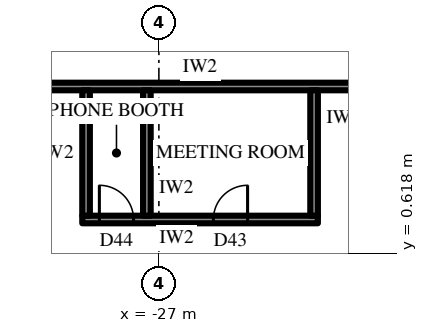
"""IFC4 building model, lengths in metres.
Left out: names, types, materials, properties, quantities, classifications, styles, units other than length and angle.
Written with IfcOpenShell. Run it as: python <this file> out.ifc"""

import sys

from ifc_helpers import new_model, si_unit, direction, frame, frame_2d, origin, place, context, subcontext, project, spatial, rectangle, extrude, element, fill, save


model = new_model("IFC4")
c1 = context("Model", 3, precision=1e-05, world=origin(), true_north=direction((0.0, 1.0)))
c2 = subcontext(c1, "Body", "Model", "MODEL_VIEW")
j1 = project(units=[si_unit("LENGTHUNIT", "METRE"), si_unit("PLANEANGLEUNIT", "RADIAN")], contexts=[c1])
p1 = place(None, origin())
s1 = spatial("IfcSite", under=j1, at=p1, CompositionType="ELEMENT")
p2 = place(p1, origin())
s2 = spatial("IfcBuilding", under=s1, at=p2, CompositionType="ELEMENT")
p3 = place(p2, frame((0.0, 0.0, 195.1)))
s3 = spatial("IfcBuildingStorey", under=s2, at=p3, CompositionType="ELEMENT", Elevation=195.1)
p4 = place(p3, frame((-18.6, 5.0, 0.0), z_axis=(0.0, 0.0, 1.0), x_axis=(-1.0, 0.0, 0.0)))
e1 = element("IfcWall", 1, at=p4, inside=s3, PredefinedType="PARTITIONING", context=c2, shape_type="SweptSolid", body=[
    extrude(rectangle(XDim=14.632, YDim=0.2, at=frame_2d((7.316, 0.0))), origin(), (0.0, 0.0, 1.0), 4.0),
])
p5 = place(p3, frame((-22.816, 1.5, 0.0), z_axis=(0.0, 0.0, 1.0), x_axis=(-1.0, 0.0, 0.0)))
e2 = element("IfcWall", 2, at=p5, inside=s3, PredefinedType="PARTITIONING", context=c2, shape_type="SweptSolid", body=[
    extrude(rectangle(XDim=6.2, YDim=0.2, at=frame_2d((3.1, 0.0))), origin(), (0.0, 0.0, 1.0), 4.0),
])
p6 = place(p5, frame((1.85, 0.0, 0.0)))
e3 = element("IfcOpeningElement", 3, at=p6, cuts=e2, PredefinedType="OPENING", context=c2, shape_type="SweptSolid", body=[
    extrude(rectangle(XDim=0.9, YDim=2.2, at=frame_2d((0.45, 1.1))), frame((0.0, 0.11, 0.0), z_axis=(0.0, -1.0, 0.0), x_axis=(1.0, 0.0, 0.0)), (0.0, 0.0, 1.0), 0.22),
])
p7 = place(p5, frame((4.85, 0.0, 0.0)))
e4 = element("IfcOpeningElement", 4, at=p7, cuts=e2, PredefinedType="OPENING", context=c2, shape_type="SweptSolid", body=[
    extrude(rectangle(XDim=0.9, YDim=2.2, at=frame_2d((0.45, 1.1))), frame((0.0, 0.11, 0.0), z_axis=(0.0, -1.0, 0.0), x_axis=(1.0, 0.0, 0.0)), (0.0, 0.0, 1.0), 0.22),
])
for number, where, z_axis, x_axis in (
    (5, (-22.916, 4.9, 0.0), (0.0, 0.0, 1.0), (0.0, -1.0, 0.0)),
    (6, (-27.316, 4.9, 0.0), (0.0, 0.0, 1.0), (0.0, -1.0, 0.0)),
    (7, (-28.916, 4.9, 0.0), (0.0, 0.0, 1.0), (0.0, -1.0, 0.0)),
):
    element("IfcWall", number, at=place(p3, frame(where, z_axis=z_axis, x_axis=x_axis)), inside=s3, PredefinedType="PARTITIONING", context=c2, shape_type="SweptSolid", body=[
        extrude(rectangle(XDim=3.3, YDim=0.2, at=frame_2d((1.65, 0.0))), origin(), (0.0, 0.0, 1.0), 4.0),
    ])
p8 = place(p6, frame((0.9, 0.0, 0.0), z_axis=(0.0, 0.0, 1.0), x_axis=(-1.0, 0.0, 0.0)))
e8 = element("IfcDoor", 8, at=p8, inside=s3, OperationType="SINGLE_SWING_LEFT", PredefinedType="DOOR", context=c2, shape_type="SweptSolid", body=[
    extrude(rectangle(XDim=0.9, YDim=2.2, at=frame_2d((0.45, 1.1))), frame((0.0, 0.025, 0.0), z_axis=(0.0, -1.0, 0.0), x_axis=(1.0, 0.0, 0.0)), (0.0, 0.0, 1.0), 0.05),
])
fill(e3, e8)
p9 = place(p7, frame((0.9, 0.0, 0.0), z_axis=(0.0, 0.0, 1.0), x_axis=(-1.0, 0.0, 0.0)))
e9 = element("IfcDoor", 9, at=p9, inside=s3, OperationType="SINGLE_SWING_RIGHT", PredefinedType="DOOR", context=c2, shape_type="SweptSolid", body=[
    extrude(rectangle(XDim=0.9, YDim=2.2, at=frame_2d((0.45, 1.1))), frame((0.0, 0.025, 0.0), z_axis=(0.0, -1.0, 0.0), x_axis=(1.0, 0.0, 0.0)), (0.0, 0.0, 1.0), 0.05),
])
fill(e4, e9)
save(model, sys.argv[1])
